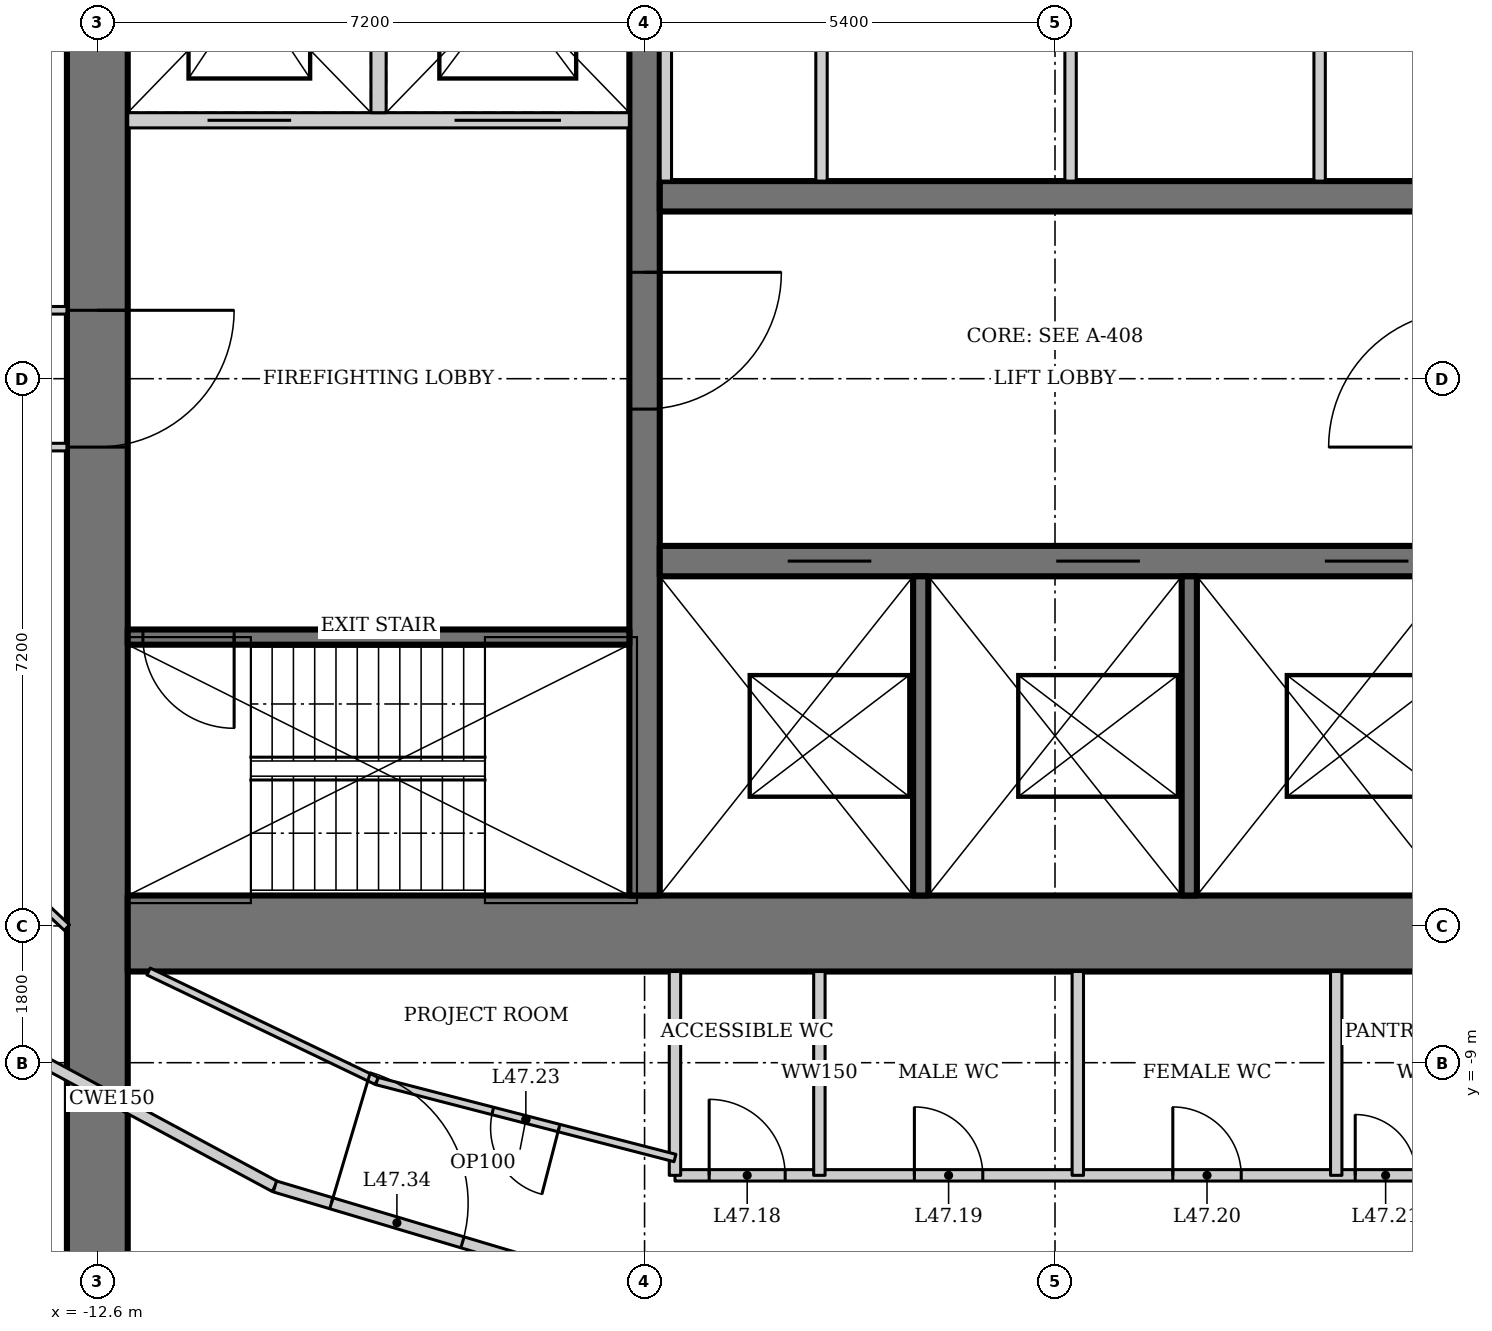
"""IFC4 building model, lengths in metres.
Left out: names, types, materials, properties, quantities, classifications, styles, units other than length and angle.
Written with IfcOpenShell. Run it as: python <this file> out.ifc"""

import sys

from ifc_helpers import new_model, si_unit, direction, frame, frame_2d, origin, place, context, subcontext, project, spatial, rectangle, extrude, element, fill, save


model = new_model("IFC4")
c1 = context("Model", 3, precision=1e-05, world=origin(), true_north=direction((0.0, 1.0)))
c2 = subcontext(c1, "Body", "Model", "MODEL_VIEW")
j1 = project(units=[si_unit("LENGTHUNIT", "METRE"), si_unit("PLANEANGLEUNIT", "RADIAN")], contexts=[c1])
p1 = place(None, origin())
s1 = spatial("IfcSite", under=j1, at=p1, CompositionType="ELEMENT")
p2 = place(p1, origin())
s2 = spatial("IfcBuilding", under=s1, at=p2, CompositionType="ELEMENT")
p3 = place(p2, frame((0.0, 0.0, 203.2)))
s3 = spatial("IfcBuildingStorey", under=s2, at=p3, CompositionType="ELEMENT", Elevation=203.2)
p4 = place(p3, frame((-12.6, 13.0, 0.0), z_axis=(0.0, 0.0, 1.0), x_axis=(0.0, -1.0, 0.0)))
e1 = element("IfcWall", 1, at=p4, inside=s3, PredefinedType="SHEAR", context=c2, shape_type="SweptSolid", body=[
    extrude(rectangle(XDim=26.0, YDim=0.8, at=frame_2d((13.0, 0.0))), origin(), (0.0, 0.0, 1.0), 4.2),
])
p5 = place(p4, frame((12.1, 0.0, 0.0)))
e2 = element("IfcOpeningElement", 2, at=p5, cuts=e1, PredefinedType="OPENING", context=c2, shape_type="SweptSolid", body=[
    extrude(rectangle(XDim=1.8, YDim=2.1, at=frame_2d((0.9, 1.05))), frame((0.0, 0.41, 0.0), z_axis=(0.0, -1.0, 0.0), x_axis=(1.0, 0.0, 0.0)), (0.0, 0.0, 1.0), 0.82),
])
p6 = place(p3, frame((-12.2, -7.3, 0.0), z_axis=(0.0, 0.0, 1.0), x_axis=(1.0, 0.0, 0.0)))
e3 = element("IfcWall", 3, at=p6, inside=s3, PredefinedType="SHEAR", context=c2, shape_type="SweptSolid", body=[
    extrude(rectangle(XDim=24.4, YDim=1.0, at=frame_2d((12.2, 0.0))), origin(), (0.0, 0.0, 1.0), 4.2),
])
p7 = place(p3, frame((-5.4, 7.8, 0.0), z_axis=(0.0, 0.0, 1.0), x_axis=(0.0, -1.0, 0.0)))
e4 = element("IfcWall", 4, at=p7, inside=s3, PredefinedType="SHEAR", context=c2, shape_type="SweptSolid", body=[
    extrude(rectangle(XDim=14.6, YDim=0.4, at=frame_2d((7.3, 0.0))), origin(), (0.0, 0.0, 1.0), 4.2),
])
p8 = place(p7, frame((6.4, 0.0, 0.0)))
e5 = element("IfcOpeningElement", 5, at=p8, cuts=e4, PredefinedType="OPENING", context=c2, shape_type="SweptSolid", body=[
    extrude(rectangle(XDim=1.8, YDim=2.1, at=frame_2d((0.9, 1.05))), frame((0.0, 0.21, 0.0), z_axis=(0.0, -1.0, 0.0), x_axis=(1.0, 0.0, 0.0)), (0.0, 0.0, 1.0), 0.42),
])
p9 = place(p3, frame((-5.2, -2.4, 0.0), z_axis=(0.0, 0.0, 1.0), x_axis=(1.0, 0.0, 0.0)))
e6 = element("IfcWall", 6, at=p9, inside=s3, PredefinedType="SHEAR", context=c2, shape_type="SweptSolid", body=[
    extrude(rectangle(XDim=10.4, YDim=0.4, at=frame_2d((5.2, 0.0))), origin(), (0.0, 0.0, 1.0), 4.2),
])
p10 = place(p9, frame((1.683, 0.0, 0.0)))
e7 = element("IfcOpeningElement", 7, at=p10, cuts=e6, PredefinedType="OPENING", context=c2, shape_type="SweptSolid", body=[
    extrude(rectangle(XDim=1.1, YDim=2.2, at=frame_2d((0.55, 1.1))), frame((0.0, 0.21, 0.0), z_axis=(0.0, -1.0, 0.0), x_axis=(1.0, 0.0, 0.0)), (0.0, 0.0, 1.0), 0.42),
])
p11 = place(p9, frame((5.217, 0.0, 0.0)))
e8 = element("IfcOpeningElement", 8, at=p11, cuts=e6, PredefinedType="OPENING", context=c2, shape_type="SweptSolid", body=[
    extrude(rectangle(XDim=1.1, YDim=2.2, at=frame_2d((0.55, 1.1))), frame((0.0, 0.21, 0.0), z_axis=(0.0, -1.0, 0.0), x_axis=(1.0, 0.0, 0.0)), (0.0, 0.0, 1.0), 0.42),
])
p12 = place(p9, frame((8.75, 0.0, 0.0)))
e9 = element("IfcOpeningElement", 9, at=p12, cuts=e6, PredefinedType="OPENING", context=c2, shape_type="SweptSolid", body=[
    extrude(rectangle(XDim=1.1, YDim=2.2, at=frame_2d((0.55, 1.1))), frame((0.0, 0.21, 0.0), z_axis=(0.0, -1.0, 0.0), x_axis=(1.0, 0.0, 0.0)), (0.0, 0.0, 1.0), 0.42),
])
for number, where, z_axis, x_axis in (
    (10, (-1.767, -2.6, 0.0), (0.0, 0.0, 1.0), (0.0, -1.0, 0.0)),
    (11, (1.767, -2.6, 0.0), (0.0, 0.0, 1.0), (0.0, -1.0, 0.0)),
):
    element("IfcWall", number, at=place(p3, frame(where, z_axis=z_axis, x_axis=x_axis)), inside=s3, PredefinedType="SOLIDWALL", context=c2, shape_type="SweptSolid", body=[
        extrude(rectangle(XDim=4.2, YDim=0.2, at=frame_2d((2.1, 0.0))), origin(), (0.0, 0.0, 1.0), 4.2),
    ])
p13 = place(p3, frame((5.2, 2.4, 0.0), z_axis=(0.0, 0.0, 1.0), x_axis=(-1.0, 0.0, 0.0)))
e12 = element("IfcWall", 12, at=p13, inside=s3, PredefinedType="SHEAR", context=c2, shape_type="SweptSolid", body=[
    extrude(rectangle(XDim=10.4, YDim=0.4, at=frame_2d((5.2, 0.0))), origin(), (0.0, 0.0, 1.0), 4.2),
])
p14 = place(p3, frame((-5.6, -3.4, 0.0), z_axis=(0.0, 0.0, 1.0), x_axis=(-1.0, 0.0, 0.0)))
e13 = element("IfcWall", 13, at=p14, inside=s3, PredefinedType="SHEAR", context=c2, shape_type="SweptSolid", body=[
    extrude(rectangle(XDim=6.6, YDim=0.2, at=frame_2d((3.3, 0.0))), origin(), (0.0, 0.0, 1.0), 4.2),
])
p15 = place(p14, frame((5.2, 0.0, 0.0)))
e14 = element("IfcOpeningElement", 14, at=p15, cuts=e13, PredefinedType="OPENING", context=c2, shape_type="SweptSolid", body=[
    extrude(rectangle(XDim=1.2, YDim=2.1, at=frame_2d((0.6, 1.05))), frame((0.0, 0.11, 0.0), z_axis=(0.0, -1.0, 0.0), x_axis=(1.0, 0.0, 0.0)), (0.0, 0.0, 1.0), 0.22),
])
p16 = place(p3, frame((-12.2, 3.4, 0.0), z_axis=(0.0, 0.0, 1.0), x_axis=(1.0, 0.0, 0.0)))
e15 = element("IfcWall", 15, at=p16, inside=s3, PredefinedType="SOLIDWALL", context=c2, shape_type="SweptSolid", body=[
    extrude(rectangle(XDim=6.6, YDim=0.2, at=frame_2d((3.3, 0.0))), origin(), (0.0, 0.0, 1.0), 4.2),
])
p17 = place(p16, frame((1.05, 0.0, 0.0)))
e16 = element("IfcOpeningElement", 16, at=p17, cuts=e15, PredefinedType="OPENING", context=c2, shape_type="SweptSolid", body=[
    extrude(rectangle(XDim=1.1, YDim=2.2, at=frame_2d((0.55, 1.1))), frame((0.0, 0.11, 0.0), z_axis=(0.0, -1.0, 0.0), x_axis=(1.0, 0.0, 0.0)), (0.0, 0.0, 1.0), 0.22),
])
p18 = place(p16, frame((4.3, 0.0, 0.0)))
e17 = element("IfcOpeningElement", 17, at=p18, cuts=e15, PredefinedType="OPENING", context=c2, shape_type="SweptSolid", body=[
    extrude(rectangle(XDim=1.4, YDim=2.2, at=frame_2d((0.7, 1.1))), frame((0.0, 0.11, 0.0), z_axis=(0.0, -1.0, 0.0), x_axis=(1.0, 0.0, 0.0)), (0.0, 0.0, 1.0), 0.22),
])
p19 = place(p3, frame((-8.9, 3.5, 0.0), z_axis=(0.0, 0.0, 1.0), x_axis=(0.0, 1.0, 0.0)))
e18 = element("IfcWall", 18, at=p19, inside=s3, PredefinedType="SOLIDWALL", context=c2, shape_type="SweptSolid", body=[
    extrude(rectangle(XDim=3.3, YDim=0.2, at=frame_2d((1.65, 0.0))), origin(), (0.0, 0.0, 1.0), 4.2),
])
p20 = place(p3, frame((-14.556, -8.318, 0.0), z_axis=(0.0, 0.0, 1.0), x_axis=(0.88053863253, -0.47397438393, 0.0)))
e19 = element("IfcWall", 19, at=p20, inside=s3, PredefinedType="PARTITIONING", context=c2, shape_type="SweptSolid", body=[
    extrude(rectangle(XDim=4.875, YDim=0.15, at=frame_2d((2.438, 0.0))), origin(), (0.0, 0.0, 1.0), 4.05),
])
p21 = place(p3, frame((-10.264, -10.628, 0.0), z_axis=(0.0, 0.0, 1.0), x_axis=(0.958384389306, -0.285480931648, 0.0)))
e20 = element("IfcWall", 20, at=p21, inside=s3, PredefinedType="PARTITIONING", context=c2, shape_type="SweptSolid", body=[
    extrude(rectangle(XDim=4.392, YDim=0.15, at=frame_2d((2.196, 0.0))), origin(), (0.0, 0.0, 1.0), 4.05),
])
p22 = place(p21, frame((0.775, 0.0, 0.0)))
e21 = element("IfcOpeningElement", 21, at=p22, cuts=e20, PredefinedType="OPENING", context=c2, shape_type="SweptSolid", body=[
    extrude(rectangle(XDim=1.8, YDim=2.1, at=frame_2d((0.9, 1.05))), frame((0.0, 0.085, 0.0), z_axis=(0.0, -1.0, 0.0), x_axis=(1.0, 0.0, 0.0)), (0.0, 0.0, 1.0), 0.17),
])
for number, where, z_axis, x_axis in (
    (22, (-5.12, 2.6, 0.0), (0.0, 0.0, 1.0), (0.0, 1.0, 0.0)),
    (23, (-3.072, 2.6, 0.0), (0.0, 0.0, 1.0), (0.0, 1.0, 0.0)),
    (24, (0.205, 2.6, 0.0), (0.0, 0.0, 1.0), (0.0, 1.0, 0.0)),
    (25, (3.482, 2.6, 0.0), (0.0, 0.0, 1.0), (0.0, 1.0, 0.0)),
):
    element("IfcWall", number, at=place(p3, frame(where, z_axis=z_axis, x_axis=x_axis)), inside=s3, PredefinedType="SOLIDWALL", context=c2, shape_type="SweptSolid", body=[
        extrude(rectangle(XDim=4.4, YDim=0.15, at=frame_2d((2.2, 0.0))), origin(), (0.0, 0.0, 1.0), 4.05),
    ])
p23 = place(p3, frame((-5.0, -10.482, 0.0), z_axis=(0.0, 0.0, 1.0), x_axis=(1.0, 0.0, 0.0)))
e26 = element("IfcWall", 26, at=p23, inside=s3, PredefinedType="SOLIDWALL", context=c2, shape_type="SweptSolid", body=[
    extrude(rectangle(XDim=10.0, YDim=0.15, at=frame_2d((5.0, 0.0))), origin(), (0.0, 0.0, 1.0), 4.05),
])
p24 = place(p23, frame((0.45, 0.0, 0.0)))
e27 = element("IfcOpeningElement", 27, at=p24, cuts=e26, PredefinedType="OPENING", context=c2, shape_type="SweptSolid", body=[
    extrude(rectangle(XDim=1.0, YDim=2.1, at=frame_2d((0.5, 1.05))), frame((0.0, 0.085, 0.0), z_axis=(0.0, -1.0, 0.0), x_axis=(1.0, 0.0, 0.0)), (0.0, 0.0, 1.0), 0.17),
])
p25 = place(p23, frame((3.15, 0.0, 0.0)))
e28 = element("IfcOpeningElement", 28, at=p25, cuts=e26, PredefinedType="OPENING", context=c2, shape_type="SweptSolid", body=[
    extrude(rectangle(XDim=0.9, YDim=2.1, at=frame_2d((0.45, 1.05))), frame((0.0, 0.085, 0.0), z_axis=(0.0, -1.0, 0.0), x_axis=(1.0, 0.0, 0.0)), (0.0, 0.0, 1.0), 0.17),
])
p26 = place(p23, frame((6.55, 0.0, 0.0)))
e29 = element("IfcOpeningElement", 29, at=p26, cuts=e26, PredefinedType="OPENING", context=c2, shape_type="SweptSolid", body=[
    extrude(rectangle(XDim=0.9, YDim=2.1, at=frame_2d((0.45, 1.05))), frame((0.0, 0.085, 0.0), z_axis=(0.0, -1.0, 0.0), x_axis=(1.0, 0.0, 0.0)), (0.0, 0.0, 1.0), 0.17),
])
p27 = place(p23, frame((8.95, 0.0, 0.0)))
e30 = element("IfcOpeningElement", 30, at=p27, cuts=e26, PredefinedType="OPENING", context=c2, shape_type="SweptSolid", body=[
    extrude(rectangle(XDim=0.8, YDim=2.1, at=frame_2d((0.4, 1.05))), frame((0.0, 0.085, 0.0), z_axis=(0.0, -1.0, 0.0), x_axis=(1.0, 0.0, 0.0)), (0.0, 0.0, 1.0), 0.17),
])
for number, where, z_axis, x_axis in (
    (31, (-5.0, -7.8, 0.0), (0.0, 0.0, 1.0), (0.0, -1.0, 0.0)),
    (32, (-3.1, -7.8, 0.0), (0.0, 0.0, 1.0), (0.0, -1.0, 0.0)),
    (33, (0.3, -7.8, 0.0), (0.0, 0.0, 1.0), (0.0, -1.0, 0.0)),
    (34, (3.7, -7.8, 0.0), (0.0, 0.0, 1.0), (0.0, -1.0, 0.0)),
):
    element("IfcWall", number, at=place(p3, frame(where, z_axis=z_axis, x_axis=x_axis)), inside=s3, PredefinedType="SOLIDWALL", context=c2, shape_type="SweptSolid", body=[
        extrude(rectangle(XDim=2.682, YDim=0.15, at=frame_2d((1.341, 0.0))), origin(), (0.0, 0.0, 1.0), 4.05),
    ])
p28 = place(p3, frame((-13.0, -7.222, 0.0), z_axis=(0.0, 0.0, 1.0), x_axis=(-0.730651186567, 0.682750938167, 0.0)))
e35 = element("IfcWall", 35, at=p28, inside=s3, PredefinedType="PARTITIONING", context=c2, shape_type="SweptSolid", body=[
    extrude(rectangle(XDim=4.603, YDim=0.1, at=frame_2d((2.301, 0.0))), origin(), (0.0, 0.0, 1.0), 4.05),
])
p29 = place(p28, frame((1.851, 0.0, 0.0)))
e36 = element("IfcOpeningElement", 36, at=p29, cuts=e35, PredefinedType="OPENING", context=c2, shape_type="SweptSolid", body=[
    extrude(rectangle(XDim=0.9, YDim=2.1, at=frame_2d((0.45, 1.05))), frame((0.0, 0.06, 0.0), z_axis=(0.0, -1.0, 0.0), x_axis=(1.0, 0.0, 0.0)), (0.0, 0.0, 1.0), 0.12),
])
p30 = place(p3, frame((-5.0, -10.254, 0.0), z_axis=(0.0, 0.0, 1.0), x_axis=(-0.968224167198, 0.250083910027, 0.0)))
e37 = element("IfcWall", 37, at=p30, inside=s3, PredefinedType="PARTITIONING", context=c2, shape_type="SweptSolid", body=[
    extrude(rectangle(XDim=4.052, YDim=0.1, at=frame_2d((2.026, 0.0))), origin(), (0.0, 0.0, 1.0), 4.05),
])
p31 = place(p30, frame((1.576, 0.0, 0.0)))
e38 = element("IfcOpeningElement", 38, at=p31, cuts=e37, PredefinedType="OPENING", context=c2, shape_type="SweptSolid", body=[
    extrude(rectangle(XDim=0.9, YDim=2.1, at=frame_2d((0.45, 1.05))), frame((0.0, 0.06, 0.0), z_axis=(0.0, -1.0, 0.0), x_axis=(1.0, 0.0, 0.0)), (0.0, 0.0, 1.0), 0.12),
])
p32 = place(p3, frame((-8.924, -9.241, 0.0), z_axis=(0.0, 0.0, 1.0), x_axis=(-0.901553947207, 0.432666708073, 0.0)))
e39 = element("IfcWall", 39, at=p32, inside=s3, PredefinedType="PARTITIONING", context=c2, shape_type="SweptSolid", body=[
    extrude(rectangle(XDim=3.33, YDim=0.1, at=frame_2d((1.665, 0.0))), origin(), (0.0, 0.0, 1.0), 4.05),
])
p33 = place(p3, frame((-16.363, 4.08, 0.0), z_axis=(0.0, 0.0, 1.0), x_axis=(0.730651186567, 0.682750938167, 0.0)))
e40 = element("IfcWall", 40, at=p33, inside=s3, PredefinedType="PARTITIONING", context=c2, shape_type="SweptSolid", body=[
    extrude(rectangle(XDim=4.603, YDim=0.1, at=frame_2d((2.301, 0.0))), origin(), (0.0, 0.0, 1.0), 4.05),
])
p34 = place(p33, frame((1.851, 0.0, 0.0)))
e41 = element("IfcOpeningElement", 41, at=p34, cuts=e40, PredefinedType="OPENING", context=c2, shape_type="SweptSolid", body=[
    extrude(rectangle(XDim=0.9, YDim=2.1, at=frame_2d((0.45, 1.05))), frame((0.0, 0.06, 0.0), z_axis=(0.0, -1.0, 0.0), x_axis=(1.0, 0.0, 0.0)), (0.0, 0.0, 1.0), 0.12),
])
for number, where, z_axis, x_axis in (
    (42, (-15.165, -0.9, 0.0), (0.0, 0.0, 1.0), (1.0, 0.0, 0.0)),
    (43, (-13.0, 0.9, 0.0), (0.0, 0.0, 1.0), (-1.0, 0.0, 0.0)),
):
    element("IfcWall", number, at=place(p3, frame(where, z_axis=z_axis, x_axis=x_axis)), inside=s3, PredefinedType="PARTITIONING", context=c2, shape_type="SweptSolid", body=[
        extrude(rectangle(XDim=2.165, YDim=0.1, at=frame_2d((1.083, 0.0))), origin(), (0.0, 0.0, 1.0), 4.05),
    ])
p35 = place(p8, origin())
e44 = element("IfcDoor", 44, at=p35, inside=s3, OperationType="DOUBLE_DOOR_DOUBLE_SWING", PredefinedType="DOOR", context=c2, shape_type="SweptSolid", body=[
    extrude(rectangle(XDim=1.8, YDim=2.1, at=frame_2d((0.9, 1.05))), frame((0.0, 0.025, 0.0), z_axis=(0.0, -1.0, 0.0), x_axis=(1.0, 0.0, 0.0)), (0.0, 0.0, 1.0), 0.05),
])
fill(e5, e44)
p36 = place(p15, origin())
e45 = element("IfcDoor", 45, at=p36, inside=s3, OperationType="SINGLE_SWING_RIGHT", PredefinedType="DOOR", context=c2, shape_type="SweptSolid", body=[
    extrude(rectangle(XDim=1.2, YDim=2.1, at=frame_2d((0.6, 1.05))), frame((0.0, 0.025, 0.0), z_axis=(0.0, -1.0, 0.0), x_axis=(1.0, 0.0, 0.0)), (0.0, 0.0, 1.0), 0.05),
])
fill(e14, e45)
p37 = place(p5, origin())
e46 = element("IfcDoor", 46, at=p37, inside=s3, OperationType="DOUBLE_DOOR_DOUBLE_SWING", PredefinedType="DOOR", context=c2, shape_type="SweptSolid", body=[
    extrude(rectangle(XDim=1.8, YDim=2.1, at=frame_2d((0.9, 1.05))), frame((0.0, 0.025, 0.0), z_axis=(0.0, -1.0, 0.0), x_axis=(1.0, 0.0, 0.0)), (0.0, 0.0, 1.0), 0.05),
])
fill(e2, e46)
p38 = place(p10, origin())
e47 = element("IfcDoor", 47, at=p38, inside=s3, OperationType="DOUBLE_DOOR_SLIDING", PredefinedType="DOOR", context=c2, shape_type="SweptSolid", body=[
    extrude(rectangle(XDim=1.1, YDim=2.2, at=frame_2d((0.55, 1.1))), frame((0.0, 0.025, 0.0), z_axis=(0.0, -1.0, 0.0), x_axis=(1.0, 0.0, 0.0)), (0.0, 0.0, 1.0), 0.05),
])
fill(e7, e47)
p39 = place(p11, origin())
e48 = element("IfcDoor", 48, at=p39, inside=s3, OperationType="DOUBLE_DOOR_SLIDING", PredefinedType="DOOR", context=c2, shape_type="SweptSolid", body=[
    extrude(rectangle(XDim=1.1, YDim=2.2, at=frame_2d((0.55, 1.1))), frame((0.0, 0.025, 0.0), z_axis=(0.0, -1.0, 0.0), x_axis=(1.0, 0.0, 0.0)), (0.0, 0.0, 1.0), 0.05),
])
fill(e8, e48)
p40 = place(p12, origin())
e49 = element("IfcDoor", 49, at=p40, inside=s3, OperationType="DOUBLE_DOOR_SLIDING", PredefinedType="DOOR", context=c2, shape_type="SweptSolid", body=[
    extrude(rectangle(XDim=1.1, YDim=2.2, at=frame_2d((0.55, 1.1))), frame((0.0, 0.025, 0.0), z_axis=(0.0, -1.0, 0.0), x_axis=(1.0, 0.0, 0.0)), (0.0, 0.0, 1.0), 0.05),
])
fill(e9, e49)
p41 = place(p17, origin())
e50 = element("IfcDoor", 50, at=p41, inside=s3, OperationType="DOUBLE_DOOR_SLIDING", PredefinedType="DOOR", context=c2, shape_type="SweptSolid", body=[
    extrude(rectangle(XDim=1.1, YDim=2.2, at=frame_2d((0.55, 1.1))), frame((0.0, 0.025, 0.0), z_axis=(0.0, -1.0, 0.0), x_axis=(1.0, 0.0, 0.0)), (0.0, 0.0, 1.0), 0.05),
])
fill(e16, e50)
p42 = place(p18, origin())
e51 = element("IfcDoor", 51, at=p42, inside=s3, OperationType="DOUBLE_DOOR_SLIDING", PredefinedType="DOOR", context=c2, shape_type="SweptSolid", body=[
    extrude(rectangle(XDim=1.4, YDim=2.2, at=frame_2d((0.7, 1.1))), frame((0.0, 0.025, 0.0), z_axis=(0.0, -1.0, 0.0), x_axis=(1.0, 0.0, 0.0)), (0.0, 0.0, 1.0), 0.05),
])
fill(e17, e51)
p43 = place(p24, origin())
e52 = element("IfcDoor", 52, at=p43, inside=s3, OperationType="SINGLE_SWING_LEFT", PredefinedType="DOOR", context=c2, shape_type="SweptSolid", body=[
    extrude(rectangle(XDim=1.0, YDim=2.1, at=frame_2d((0.5, 1.05))), frame((0.0, 0.025, 0.0), z_axis=(0.0, -1.0, 0.0), x_axis=(1.0, 0.0, 0.0)), (0.0, 0.0, 1.0), 0.05),
])
fill(e27, e52)
p44 = place(p25, origin())
e53 = element("IfcDoor", 53, at=p44, inside=s3, OperationType="SINGLE_SWING_LEFT", PredefinedType="DOOR", context=c2, shape_type="SweptSolid", body=[
    extrude(rectangle(XDim=0.9, YDim=2.1, at=frame_2d((0.45, 1.05))), frame((0.0, 0.025, 0.0), z_axis=(0.0, -1.0, 0.0), x_axis=(1.0, 0.0, 0.0)), (0.0, 0.0, 1.0), 0.05),
])
fill(e28, e53)
p45 = place(p26, origin())
e54 = element("IfcDoor", 54, at=p45, inside=s3, OperationType="SINGLE_SWING_LEFT", PredefinedType="DOOR", context=c2, shape_type="SweptSolid", body=[
    extrude(rectangle(XDim=0.9, YDim=2.1, at=frame_2d((0.45, 1.05))), frame((0.0, 0.025, 0.0), z_axis=(0.0, -1.0, 0.0), x_axis=(1.0, 0.0, 0.0)), (0.0, 0.0, 1.0), 0.05),
])
fill(e29, e54)
p46 = place(p27, origin())
e55 = element("IfcDoor", 55, at=p46, inside=s3, OperationType="SINGLE_SWING_LEFT", PredefinedType="DOOR", context=c2, shape_type="SweptSolid", body=[
    extrude(rectangle(XDim=0.8, YDim=2.1, at=frame_2d((0.4, 1.05))), frame((0.0, 0.025, 0.0), z_axis=(0.0, -1.0, 0.0), x_axis=(1.0, 0.0, 0.0)), (0.0, 0.0, 1.0), 0.05),
])
fill(e30, e55)
p47 = place(p31, origin())
e56 = element("IfcDoor", 56, at=p47, inside=s3, OperationType="SINGLE_SWING_LEFT", PredefinedType="DOOR", context=c2, shape_type="SweptSolid", body=[
    extrude(rectangle(XDim=0.9, YDim=2.1, at=frame_2d((0.45, 1.05))), frame((0.0, 0.025, 0.0), z_axis=(0.0, -1.0, 0.0), x_axis=(1.0, 0.0, 0.0)), (0.0, 0.0, 1.0), 0.05),
])
fill(e38, e56)
p48 = place(p22, origin())
e57 = element("IfcDoor", 57, at=p48, inside=s3, OperationType="DOUBLE_DOOR_DOUBLE_SWING", PredefinedType="DOOR", context=c2, shape_type="SweptSolid", body=[
    extrude(rectangle(XDim=1.8, YDim=2.1, at=frame_2d((0.9, 1.05))), frame((0.0, 0.025, 0.0), z_axis=(0.0, -1.0, 0.0), x_axis=(1.0, 0.0, 0.0)), (0.0, 0.0, 1.0), 0.05),
])
fill(e21, e57)
save(model, sys.argv[1])
